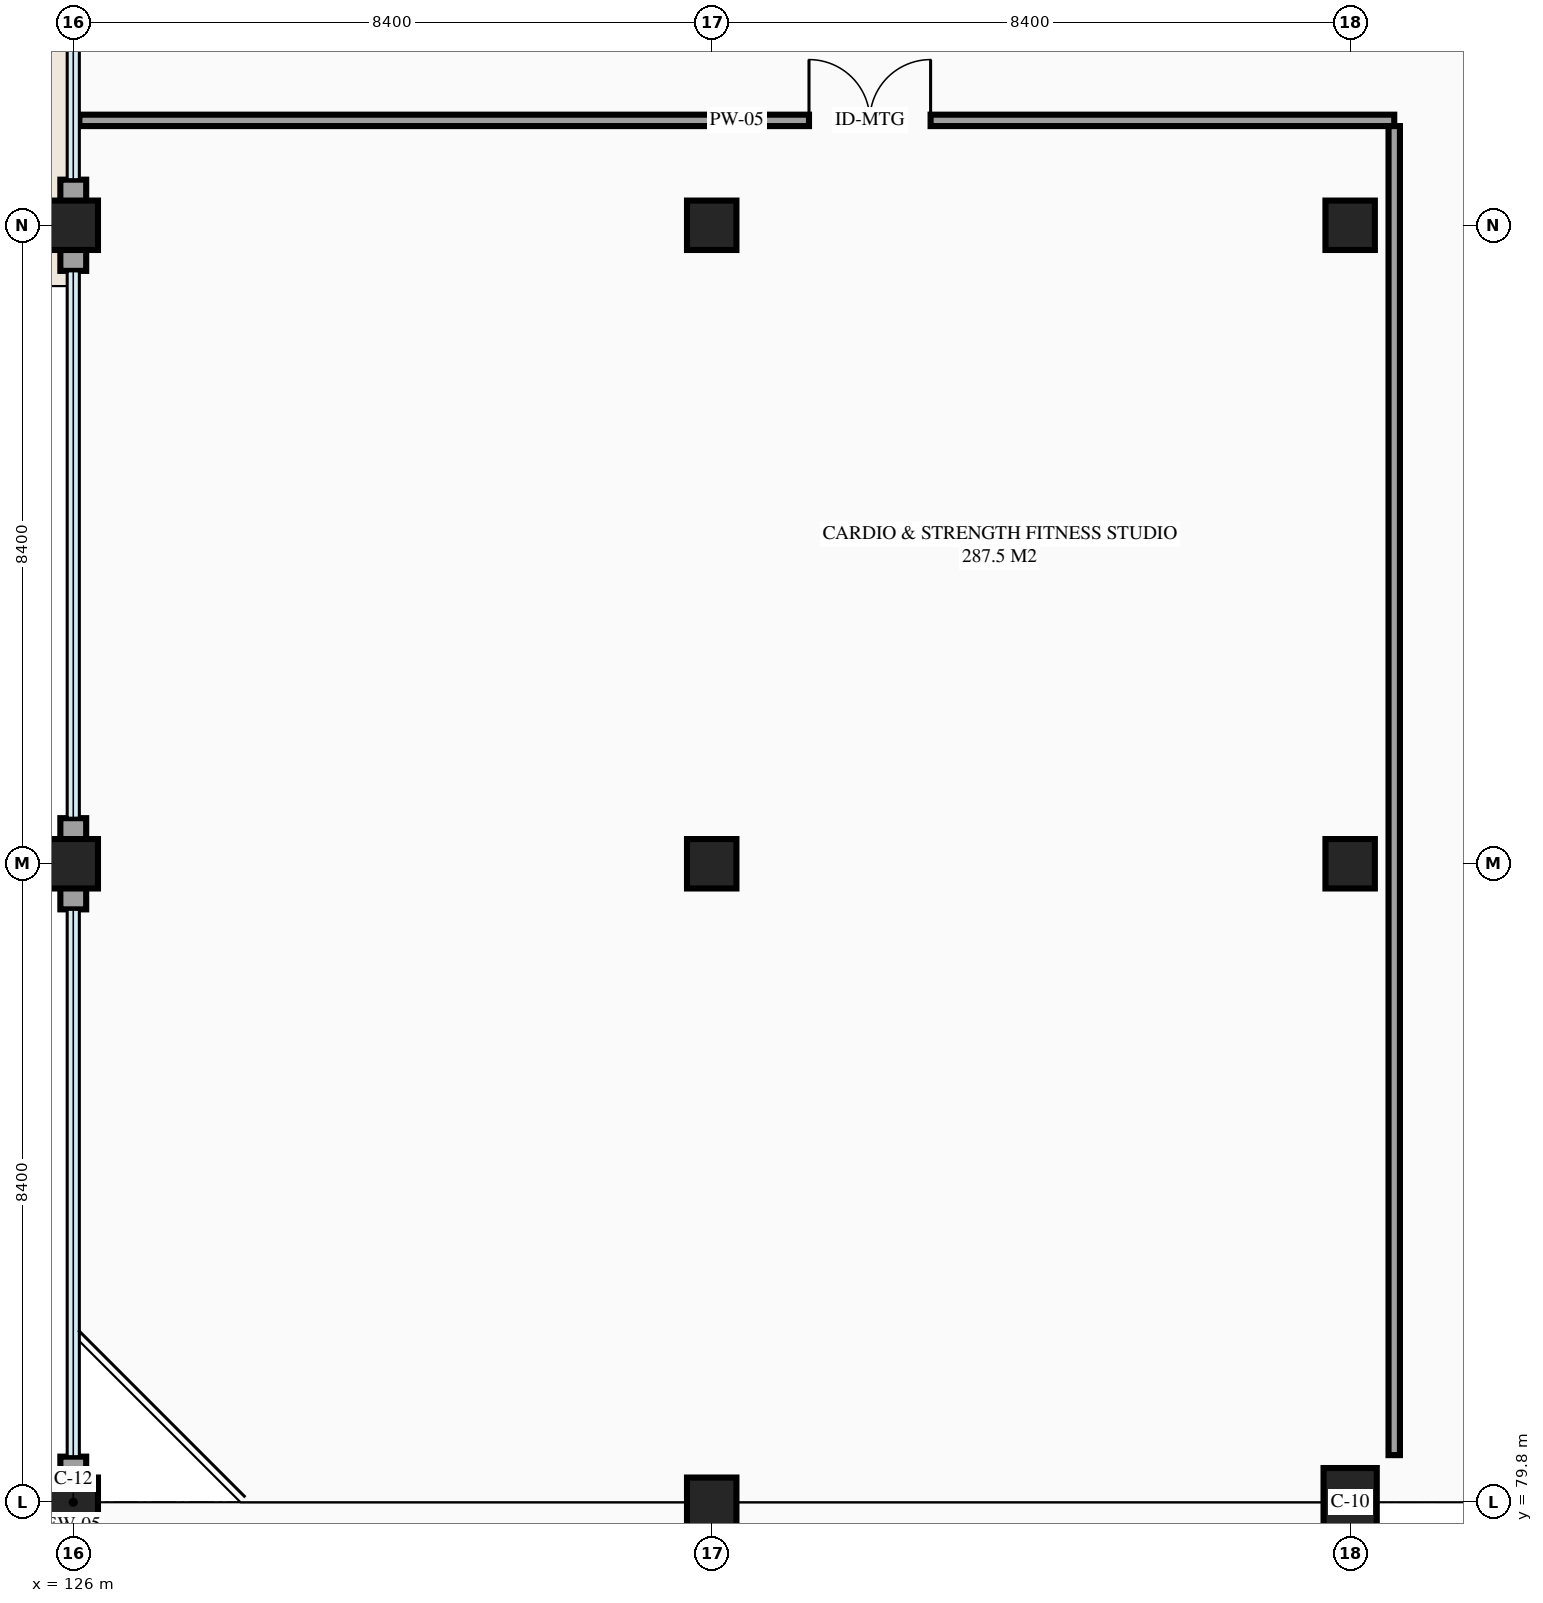
"""IFC4 building model, lengths in metres.
Left out: names, types, materials, properties, quantities, classifications, styles, units other than length and angle.
Written with IfcOpenShell. Run it as: python <this file> out.ifc"""

import sys

from ifc_helpers import new_model, si_unit, direction, frame, frame_2d, origin, origin_2d, place, context, subcontext, project, spatial, rectangle, extrude, element, fill, save


model = new_model("IFC4")
c1 = context("Model", 3, precision=1e-05, world=origin(), true_north=direction((0.0, 1.0)))
c2 = subcontext(c1, "Body", "Model", "MODEL_VIEW")
j1 = project(units=[si_unit("LENGTHUNIT", "METRE"), si_unit("PLANEANGLEUNIT", "RADIAN")], contexts=[c1])
p1 = place(None, origin())
s1 = spatial("IfcSite", under=j1, at=p1, CompositionType="ELEMENT")
p2 = place(p1, origin())
s2 = spatial("IfcBuilding", under=s1, at=p2, CompositionType="ELEMENT")
p3 = place(p2, frame((0.0, 0.0, 9.9)))
s3 = spatial("IfcBuildingStorey", under=s2, at=p3, CompositionType="ELEMENT", Elevation=9.9)
for number, where, z_axis, x_axis in (
    (1, (126.0, 79.8, 0.0), (0.0, 0.0, 1.0), (1.0, 0.0, 0.0)),
    (2, (126.0, 88.2, 0.0), (0.0, 0.0, 1.0), (1.0, 0.0, 0.0)),
    (3, (126.0, 96.6, 0.0), (0.0, 0.0, 1.0), (1.0, 0.0, 0.0)),
    (4, (134.4, 79.8, 0.0), (0.0, 0.0, 1.0), (1.0, 0.0, 0.0)),
    (5, (134.4, 88.2, 0.0), (0.0, 0.0, 1.0), (1.0, 0.0, 0.0)),
    (6, (134.4, 96.6, 0.0), (0.0, 0.0, 1.0), (1.0, 0.0, 0.0)),
):
    element("IfcColumn", number, at=place(p3, frame(where, z_axis=z_axis, x_axis=x_axis)), inside=s3, PredefinedType="COLUMN", context=c2, shape_type="SweptSolid", body=[
        extrude(rectangle(XDim=0.65, YDim=0.65, at=origin_2d()), origin(), (0.0, 0.0, 1.0), 4.2),
    ])
p4 = place(p3, frame((142.8, 79.8, 0.0), z_axis=(0.0, 0.0, 1.0), x_axis=(1.0, 0.0, 0.0)))
e7 = element("IfcColumn", 7, at=p4, inside=s3, PredefinedType="COLUMN", context=c2, shape_type="SweptSolid", body=[
    extrude(rectangle(XDim=0.7, YDim=0.9, at=origin_2d()), origin(), (0.0, 0.0, 1.0), 4.2),
])
for number, where, z_axis, x_axis in (
    (8, (142.8, 88.2, 0.0), (0.0, 0.0, 1.0), (1.0, 0.0, 0.0)),
    (9, (142.8, 96.6, 0.0), (0.0, 0.0, 1.0), (1.0, 0.0, 0.0)),
):
    element("IfcColumn", number, at=place(p3, frame(where, z_axis=z_axis, x_axis=x_axis)), inside=s3, PredefinedType="COLUMN", context=c2, shape_type="SweptSolid", body=[
        extrude(rectangle(XDim=0.65, YDim=0.65, at=origin_2d()), origin(), (0.0, 0.0, 1.0), 4.2),
    ])
p5 = place(p3, frame((126.0, 79.8, 0.0), z_axis=(0.0, 0.0, 1.0), x_axis=(0.0, -1.0, 0.0)))
e10 = element("IfcWall", 10, at=p5, inside=s3, PredefinedType="STANDARD", context=c2, shape_type="SweptSolid", body=[
    extrude(rectangle(XDim=0.6, YDim=0.34, at=frame_2d((0.3, 0.0))), origin(), (0.0, 0.0, 1.0), 4.2),
])
for number, where, z_axis, x_axis in (
    (11, (126.0, 88.2, 0.0), (0.0, 0.0, 1.0), (0.0, -1.0, 0.0)),
    (12, (126.0, 80.4, 0.0), (0.0, 0.0, 1.0), (0.0, -1.0, 0.0)),
):
    element("IfcWall", number, at=place(p3, frame(where, z_axis=z_axis, x_axis=x_axis)), inside=s3, PredefinedType="STANDARD", context=c2, shape_type="SweptSolid", body=[
        extrude(rectangle(XDim=0.6, YDim=0.34, at=frame_2d((0.3, 0.0))), origin(), (0.0, 0.0, 1.0), 4.2),
    ])
for number, where, z_axis, x_axis in (
    (13, (126.0, 96.6, 0.0), (0.0, 0.0, 1.0), (0.0, -1.0, 0.0)),
    (14, (126.0, 88.8, 0.0), (0.0, 0.0, 1.0), (0.0, -1.0, 0.0)),
):
    element("IfcWall", number, at=place(p3, frame(where, z_axis=z_axis, x_axis=x_axis)), inside=s3, PredefinedType="STANDARD", context=c2, shape_type="SweptSolid", body=[
        extrude(rectangle(XDim=0.6, YDim=0.34, at=frame_2d((0.3, 0.0))), origin(), (0.0, 0.0, 1.0), 4.2),
    ])
p6 = place(p3, frame((126.0, 97.2, 0.0), z_axis=(0.0, 0.0, 1.0), x_axis=(0.0, -1.0, 0.0)))
e15 = element("IfcWall", 15, at=p6, inside=s3, PredefinedType="STANDARD", context=c2, shape_type="SweptSolid", body=[
    extrude(rectangle(XDim=0.6, YDim=0.34, at=frame_2d((0.3, 0.0))), origin(), (0.0, 0.0, 1.0), 4.2),
])
p7 = place(p3, frame((126.08, 97.98, 0.0), z_axis=(0.0, 0.0, 1.0), x_axis=(1.0, 0.0, 0.0)))
e16 = element("IfcWall", 16, at=p7, inside=s3, PredefinedType="PARTITIONING", context=c2, shape_type="SweptSolid", body=[
    extrude(rectangle(XDim=17.3, YDim=0.15, at=frame_2d((8.65, 0.0))), origin(), (0.0, 0.0, 1.0), 3.955),
])
p8 = place(p7, frame((9.6, 0.0, 0.0)))
e17 = element("IfcOpeningElement", 17, at=p8, cuts=e16, PredefinedType="OPENING", context=c2, shape_type="SweptSolid", body=[
    extrude(rectangle(XDim=1.6, YDim=2.25, at=frame_2d((0.8, 1.125))), frame((0.0, 0.085, 0.0), z_axis=(0.0, -1.0, 0.0), x_axis=(1.0, 0.0, 0.0)), (0.0, 0.0, 1.0), 0.17),
])
p9 = place(p3, frame((143.38, 80.42, 0.0), z_axis=(0.0, 0.0, 1.0), x_axis=(0.0, 1.0, 0.0)))
e18 = element("IfcWall", 18, at=p9, inside=s3, PredefinedType="PARTITIONING", context=c2, shape_type="SweptSolid", body=[
    extrude(rectangle(XDim=17.485, YDim=0.15, at=frame_2d((8.743, 0.0))), origin(), (0.0, 0.0, 1.0), 3.955),
])
p10 = place(p8, origin())
e19 = element("IfcDoor", 19, at=p10, inside=s3, OperationType="DOUBLE_DOOR_SINGLE_SWING", PredefinedType="DOOR", context=c2, shape_type="SweptSolid", body=[
    extrude(rectangle(XDim=1.6, YDim=2.25, at=frame_2d((0.8, 1.125))), frame((0.0, 0.025, 0.0), z_axis=(0.0, -1.0, 0.0), x_axis=(1.0, 0.0, 0.0)), (0.0, 0.0, 1.0), 0.05),
])
fill(e17, e19)
save(model, sys.argv[1])
